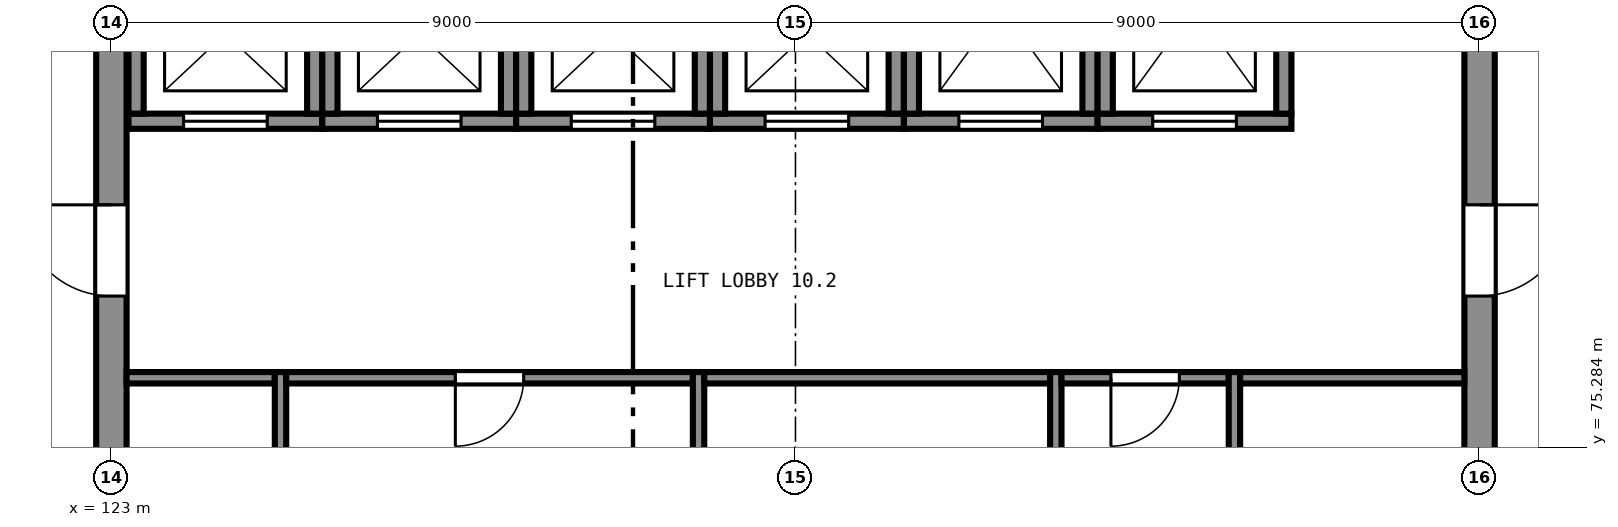
"""IFC4 building model, lengths in metres.
Left out: names, types, materials, properties, quantities, classifications, styles, units other than length and angle.
Written with IfcOpenShell. Run it as: python <this file> out.ifc"""

import sys

from ifc_helpers import new_model, si_unit, direction, frame, frame_2d, origin, place, context, subcontext, project, spatial, rectangle, extrude, element, fill, save


model = new_model("IFC4")
c1 = context("Model", 3, precision=1e-05, world=origin(), true_north=direction((0.0, 1.0)))
c2 = subcontext(c1, "Body", "Model", "MODEL_VIEW")
j1 = project(units=[si_unit("LENGTHUNIT", "METRE"), si_unit("PLANEANGLEUNIT", "RADIAN")], contexts=[c1])
p1 = place(None, origin())
s1 = spatial("IfcSite", under=j1, at=p1, CompositionType="ELEMENT")
p2 = place(p1, origin())
s2 = spatial("IfcBuilding", under=s1, at=p2, CompositionType="ELEMENT")
p3 = place(p2, frame((0.0, 0.0, 41.5)))
s3 = spatial("IfcBuildingStorey", under=s2, at=p3, CompositionType="ELEMENT", Elevation=41.5)
p4 = place(p3, frame((141.0, 65.2, 0.0), z_axis=(0.0, 0.0, 1.0), x_axis=(0.0, 1.0, 0.0)))
e1 = element("IfcWall", 1, at=p4, inside=s3, PredefinedType="SHEAR", context=c2, shape_type="SweptSolid", body=[
    extrude(rectangle(XDim=17.6, YDim=0.4, at=frame_2d((8.8, 0.0))), origin(), (0.0, 0.0, 1.0), 4.0),
])
p5 = place(p4, frame((4.325, 0.0, 0.0)))
e2 = element("IfcOpeningElement", 2, at=p5, cuts=e1, PredefinedType="OPENING", context=c2, shape_type="SweptSolid", body=[
    extrude(rectangle(XDim=1.2, YDim=2.1, at=frame_2d((0.6, 1.05))), frame((0.0, 0.21, 0.0), z_axis=(0.0, -1.0, 0.0), x_axis=(1.0, 0.0, 0.0)), (0.0, 0.0, 1.0), 0.42),
])
p6 = place(p4, frame((12.075, 0.0, 0.0)))
e3 = element("IfcOpeningElement", 3, at=p6, cuts=e1, PredefinedType="OPENING", context=c2, shape_type="SweptSolid", body=[
    extrude(rectangle(XDim=1.2, YDim=2.1, at=frame_2d((0.6, 1.05))), frame((0.0, 0.21, 0.0), z_axis=(0.0, -1.0, 0.0), x_axis=(1.0, 0.0, 0.0)), (0.0, 0.0, 1.0), 0.42),
])
p7 = place(p3, frame((123.0, 82.8, 0.0), z_axis=(0.0, 0.0, 1.0), x_axis=(0.0, -1.0, 0.0)))
e4 = element("IfcWall", 4, at=p7, inside=s3, PredefinedType="SHEAR", context=c2, shape_type="SweptSolid", body=[
    extrude(rectangle(XDim=17.6, YDim=0.4, at=frame_2d((8.8, 0.0))), origin(), (0.0, 0.0, 1.0), 4.0),
])
p8 = place(p7, frame((12.075, 0.0, 0.0)))
e5 = element("IfcOpeningElement", 5, at=p8, cuts=e4, PredefinedType="OPENING", context=c2, shape_type="SweptSolid", body=[
    extrude(rectangle(XDim=1.2, YDim=2.1, at=frame_2d((0.6, 1.05))), frame((0.0, 0.21, 0.0), z_axis=(0.0, -1.0, 0.0), x_axis=(1.0, 0.0, 0.0)), (0.0, 0.0, 1.0), 0.42),
])
p9 = place(p7, frame((4.325, 0.0, 0.0)))
e6 = element("IfcOpeningElement", 6, at=p9, cuts=e4, PredefinedType="OPENING", context=c2, shape_type="SweptSolid", body=[
    extrude(rectangle(XDim=1.2, YDim=2.1, at=frame_2d((0.6, 1.05))), frame((0.0, 0.21, 0.0), z_axis=(0.0, -1.0, 0.0), x_axis=(1.0, 0.0, 0.0)), (0.0, 0.0, 1.0), 0.42),
])
p10 = place(p3, frame((123.225, 79.575, 0.0), z_axis=(0.0, 0.0, 1.0), x_axis=(1.0, 0.0, 0.0)))
e7 = element("IfcWall", 7, at=p10, inside=s3, PredefinedType="SHEAR", context=c2, shape_type="SweptSolid", body=[
    extrude(rectangle(XDim=2.55, YDim=0.2, at=frame_2d((1.275, 0.0))), origin(), (0.0, 0.0, 1.0), 4.0),
])
p11 = place(p10, frame((0.725, 0.0, 0.0)))
e8 = element("IfcOpeningElement", 8, at=p11, cuts=e7, PredefinedType="OPENING", context=c2, shape_type="SweptSolid", body=[
    extrude(rectangle(XDim=1.1, YDim=2.1, at=frame_2d((0.55, 1.05))), frame((0.0, 0.11, 0.0), z_axis=(0.0, -1.0, 0.0), x_axis=(1.0, 0.0, 0.0)), (0.0, 0.0, 1.0), 0.22),
])
for number, where, z_axis, x_axis in (
    (9, (125.675, 79.675, 0.0), (0.0, 0.0, 1.0), (0.0, 1.0, 0.0)),
    (10, (123.325, 81.775, 0.0), (0.0, 0.0, 1.0), (0.0, -1.0, 0.0)),
):
    element("IfcWall", number, at=place(p3, frame(where, z_axis=z_axis, x_axis=x_axis)), inside=s3, PredefinedType="SHEAR", context=c2, shape_type="SweptSolid", body=[
        extrude(rectangle(XDim=2.1, YDim=0.2, at=frame_2d((1.05, 0.0))), origin(), (0.0, 0.0, 1.0), 4.0),
    ])
p12 = place(p3, frame((125.775, 79.575, 0.0), z_axis=(0.0, 0.0, 1.0), x_axis=(1.0, 0.0, 0.0)))
e11 = element("IfcWall", 11, at=p12, inside=s3, PredefinedType="SHEAR", context=c2, shape_type="SweptSolid", body=[
    extrude(rectangle(XDim=2.55, YDim=0.2, at=frame_2d((1.275, 0.0))), origin(), (0.0, 0.0, 1.0), 4.0),
])
p13 = place(p12, frame((0.725, 0.0, 0.0)))
e12 = element("IfcOpeningElement", 12, at=p13, cuts=e11, PredefinedType="OPENING", context=c2, shape_type="SweptSolid", body=[
    extrude(rectangle(XDim=1.1, YDim=2.1, at=frame_2d((0.55, 1.05))), frame((0.0, 0.11, 0.0), z_axis=(0.0, -1.0, 0.0), x_axis=(1.0, 0.0, 0.0)), (0.0, 0.0, 1.0), 0.22),
])
for number, where, z_axis, x_axis in (
    (13, (128.225, 79.675, 0.0), (0.0, 0.0, 1.0), (0.0, 1.0, 0.0)),
    (14, (125.875, 81.775, 0.0), (0.0, 0.0, 1.0), (0.0, -1.0, 0.0)),
):
    element("IfcWall", number, at=place(p3, frame(where, z_axis=z_axis, x_axis=x_axis)), inside=s3, PredefinedType="SHEAR", context=c2, shape_type="SweptSolid", body=[
        extrude(rectangle(XDim=2.1, YDim=0.2, at=frame_2d((1.05, 0.0))), origin(), (0.0, 0.0, 1.0), 4.0),
    ])
p14 = place(p3, frame((128.325, 79.575, 0.0), z_axis=(0.0, 0.0, 1.0), x_axis=(1.0, 0.0, 0.0)))
e15 = element("IfcWall", 15, at=p14, inside=s3, PredefinedType="SHEAR", context=c2, shape_type="SweptSolid", body=[
    extrude(rectangle(XDim=2.55, YDim=0.2, at=frame_2d((1.275, 0.0))), origin(), (0.0, 0.0, 1.0), 4.0),
])
p15 = place(p14, frame((0.725, 0.0, 0.0)))
e16 = element("IfcOpeningElement", 16, at=p15, cuts=e15, PredefinedType="OPENING", context=c2, shape_type="SweptSolid", body=[
    extrude(rectangle(XDim=1.1, YDim=2.1, at=frame_2d((0.55, 1.05))), frame((0.0, 0.11, 0.0), z_axis=(0.0, -1.0, 0.0), x_axis=(1.0, 0.0, 0.0)), (0.0, 0.0, 1.0), 0.22),
])
for number, where, z_axis, x_axis in (
    (17, (130.775, 79.675, 0.0), (0.0, 0.0, 1.0), (0.0, 1.0, 0.0)),
    (18, (128.425, 81.775, 0.0), (0.0, 0.0, 1.0), (0.0, -1.0, 0.0)),
):
    element("IfcWall", number, at=place(p3, frame(where, z_axis=z_axis, x_axis=x_axis)), inside=s3, PredefinedType="SHEAR", context=c2, shape_type="SweptSolid", body=[
        extrude(rectangle(XDim=2.1, YDim=0.2, at=frame_2d((1.05, 0.0))), origin(), (0.0, 0.0, 1.0), 4.0),
    ])
p16 = place(p3, frame((130.875, 79.575, 0.0), z_axis=(0.0, 0.0, 1.0), x_axis=(1.0, 0.0, 0.0)))
e19 = element("IfcWall", 19, at=p16, inside=s3, PredefinedType="SHEAR", context=c2, shape_type="SweptSolid", body=[
    extrude(rectangle(XDim=2.55, YDim=0.2, at=frame_2d((1.275, 0.0))), origin(), (0.0, 0.0, 1.0), 4.0),
])
p17 = place(p16, frame((0.725, 0.0, 0.0)))
e20 = element("IfcOpeningElement", 20, at=p17, cuts=e19, PredefinedType="OPENING", context=c2, shape_type="SweptSolid", body=[
    extrude(rectangle(XDim=1.1, YDim=2.1, at=frame_2d((0.55, 1.05))), frame((0.0, 0.11, 0.0), z_axis=(0.0, -1.0, 0.0), x_axis=(1.0, 0.0, 0.0)), (0.0, 0.0, 1.0), 0.22),
])
for number, where, z_axis, x_axis in (
    (21, (133.325, 79.675, 0.0), (0.0, 0.0, 1.0), (0.0, 1.0, 0.0)),
    (22, (130.975, 81.775, 0.0), (0.0, 0.0, 1.0), (0.0, -1.0, 0.0)),
):
    element("IfcWall", number, at=place(p3, frame(where, z_axis=z_axis, x_axis=x_axis)), inside=s3, PredefinedType="SHEAR", context=c2, shape_type="SweptSolid", body=[
        extrude(rectangle(XDim=2.1, YDim=0.2, at=frame_2d((1.05, 0.0))), origin(), (0.0, 0.0, 1.0), 4.0),
    ])
p18 = place(p3, frame((133.425, 79.575, 0.0), z_axis=(0.0, 0.0, 1.0), x_axis=(1.0, 0.0, 0.0)))
e23 = element("IfcWall", 23, at=p18, inside=s3, PredefinedType="SHEAR", context=c2, shape_type="SweptSolid", body=[
    extrude(rectangle(XDim=2.55, YDim=0.2, at=frame_2d((1.275, 0.0))), origin(), (0.0, 0.0, 1.0), 4.0),
])
p19 = place(p18, frame((0.725, 0.0, 0.0)))
e24 = element("IfcOpeningElement", 24, at=p19, cuts=e23, PredefinedType="OPENING", context=c2, shape_type="SweptSolid", body=[
    extrude(rectangle(XDim=1.1, YDim=2.1, at=frame_2d((0.55, 1.05))), frame((0.0, 0.11, 0.0), z_axis=(0.0, -1.0, 0.0), x_axis=(1.0, 0.0, 0.0)), (0.0, 0.0, 1.0), 0.22),
])
for number, where, z_axis, x_axis in (
    (25, (135.875, 79.675, 0.0), (0.0, 0.0, 1.0), (0.0, 1.0, 0.0)),
    (26, (133.525, 82.475, 0.0), (0.0, 0.0, 1.0), (0.0, -1.0, 0.0)),
):
    element("IfcWall", number, at=place(p3, frame(where, z_axis=z_axis, x_axis=x_axis)), inside=s3, PredefinedType="SHEAR", context=c2, shape_type="SweptSolid", body=[
        extrude(rectangle(XDim=2.8, YDim=0.2, at=frame_2d((1.4, 0.0))), origin(), (0.0, 0.0, 1.0), 4.0),
    ])
p20 = place(p3, frame((135.975, 79.575, 0.0), z_axis=(0.0, 0.0, 1.0), x_axis=(1.0, 0.0, 0.0)))
e27 = element("IfcWall", 27, at=p20, inside=s3, PredefinedType="SHEAR", context=c2, shape_type="SweptSolid", body=[
    extrude(rectangle(XDim=2.55, YDim=0.2, at=frame_2d((1.275, 0.0))), origin(), (0.0, 0.0, 1.0), 4.0),
])
p21 = place(p20, frame((0.725, 0.0, 0.0)))
e28 = element("IfcOpeningElement", 28, at=p21, cuts=e27, PredefinedType="OPENING", context=c2, shape_type="SweptSolid", body=[
    extrude(rectangle(XDim=1.1, YDim=2.1, at=frame_2d((0.55, 1.05))), frame((0.0, 0.11, 0.0), z_axis=(0.0, -1.0, 0.0), x_axis=(1.0, 0.0, 0.0)), (0.0, 0.0, 1.0), 0.22),
])
for number, where, z_axis, x_axis in (
    (29, (138.425, 79.675, 0.0), (0.0, 0.0, 1.0), (0.0, 1.0, 0.0)),
    (30, (136.075, 82.475, 0.0), (0.0, 0.0, 1.0), (0.0, -1.0, 0.0)),
):
    element("IfcWall", number, at=place(p3, frame(where, z_axis=z_axis, x_axis=x_axis)), inside=s3, PredefinedType="SHEAR", context=c2, shape_type="SweptSolid", body=[
        extrude(rectangle(XDim=2.8, YDim=0.2, at=frame_2d((1.4, 0.0))), origin(), (0.0, 0.0, 1.0), 4.0),
    ])
p22 = place(p3, frame((125.225, 71.725, 0.0), z_axis=(0.0, 0.0, 1.0), x_axis=(0.0, 1.0, 0.0)))
e31 = element("IfcWall", 31, at=p22, inside=s3, PredefinedType="PARTITIONING", context=c2, shape_type="SweptSolid", body=[
    extrude(rectangle(XDim=4.55, YDim=0.15, at=frame_2d((2.275, 0.0))), origin(), (0.0, 0.0, 1.0), 3.75),
])
p23 = place(p3, frame((123.2, 76.2, 0.0), z_axis=(0.0, 0.0, 1.0), x_axis=(1.0, 0.0, 0.0)))
e32 = element("IfcWall", 32, at=p23, inside=s3, PredefinedType="PARTITIONING", context=c2, shape_type="SweptSolid", body=[
    extrude(rectangle(XDim=1.95, YDim=0.15, at=frame_2d((0.975, 0.0))), origin(), (0.0, 0.0, 1.0), 3.75),
])
p24 = place(p3, frame((130.725, 71.725, 0.0), z_axis=(0.0, 0.0, 1.0), x_axis=(0.0, 1.0, 0.0)))
e33 = element("IfcWall", 33, at=p24, inside=s3, PredefinedType="PARTITIONING", context=c2, shape_type="SweptSolid", body=[
    extrude(rectangle(XDim=4.55, YDim=0.15, at=frame_2d((2.275, 0.0))), origin(), (0.0, 0.0, 1.0), 3.75),
])
p25 = place(p3, frame((125.3, 76.2, 0.0), z_axis=(0.0, 0.0, 1.0), x_axis=(1.0, 0.0, 0.0)))
e34 = element("IfcWall", 34, at=p25, inside=s3, PredefinedType="PARTITIONING", context=c2, shape_type="SweptSolid", body=[
    extrude(rectangle(XDim=5.35, YDim=0.15, at=frame_2d((2.675, 0.0))), origin(), (0.0, 0.0, 1.0), 3.75),
])
p26 = place(p25, frame((2.225, 0.0, 0.0)))
e35 = element("IfcOpeningElement", 35, at=p26, cuts=e34, PredefinedType="OPENING", context=c2, shape_type="SweptSolid", body=[
    extrude(rectangle(XDim=0.9, YDim=2.1, at=frame_2d((0.45, 1.05))), frame((0.0, 0.085, 0.0), z_axis=(0.0, -1.0, 0.0), x_axis=(1.0, 0.0, 0.0)), (0.0, 0.0, 1.0), 0.17),
])
p27 = place(p3, frame((135.425, 71.725, 0.0), z_axis=(0.0, 0.0, 1.0), x_axis=(0.0, 1.0, 0.0)))
e36 = element("IfcWall", 36, at=p27, inside=s3, PredefinedType="PARTITIONING", context=c2, shape_type="SweptSolid", body=[
    extrude(rectangle(XDim=4.55, YDim=0.15, at=frame_2d((2.275, 0.0))), origin(), (0.0, 0.0, 1.0), 3.75),
])
p28 = place(p3, frame((130.8, 76.2, 0.0), z_axis=(0.0, 0.0, 1.0), x_axis=(1.0, 0.0, 0.0)))
e37 = element("IfcWall", 37, at=p28, inside=s3, PredefinedType="PARTITIONING", context=c2, shape_type="SweptSolid", body=[
    extrude(rectangle(XDim=4.55, YDim=0.15, at=frame_2d((2.275, 0.0))), origin(), (0.0, 0.0, 1.0), 3.75),
])
p29 = place(p3, frame((137.775, 71.725, 0.0), z_axis=(0.0, 0.0, 1.0), x_axis=(0.0, 1.0, 0.0)))
e38 = element("IfcWall", 38, at=p29, inside=s3, PredefinedType="PARTITIONING", context=c2, shape_type="SweptSolid", body=[
    extrude(rectangle(XDim=4.55, YDim=0.15, at=frame_2d((2.275, 0.0))), origin(), (0.0, 0.0, 1.0), 3.75),
])
p30 = place(p3, frame((135.5, 76.2, 0.0), z_axis=(0.0, 0.0, 1.0), x_axis=(1.0, 0.0, 0.0)))
e39 = element("IfcWall", 39, at=p30, inside=s3, PredefinedType="PARTITIONING", context=c2, shape_type="SweptSolid", body=[
    extrude(rectangle(XDim=2.2, YDim=0.15, at=frame_2d((1.1, 0.0))), origin(), (0.0, 0.0, 1.0), 3.75),
])
p31 = place(p30, frame((0.65, 0.0, 0.0)))
e40 = element("IfcOpeningElement", 40, at=p31, cuts=e39, PredefinedType="OPENING", context=c2, shape_type="SweptSolid", body=[
    extrude(rectangle(XDim=0.9, YDim=2.1, at=frame_2d((0.45, 1.05))), frame((0.0, 0.085, 0.0), z_axis=(0.0, -1.0, 0.0), x_axis=(1.0, 0.0, 0.0)), (0.0, 0.0, 1.0), 0.17),
])
p32 = place(p3, frame((137.85, 76.2, 0.0), z_axis=(0.0, 0.0, 1.0), x_axis=(1.0, 0.0, 0.0)))
e41 = element("IfcWall", 41, at=p32, inside=s3, PredefinedType="PARTITIONING", context=c2, shape_type="SweptSolid", body=[
    extrude(rectangle(XDim=2.95, YDim=0.15, at=frame_2d((1.475, 0.0))), origin(), (0.0, 0.0, 1.0), 3.75),
])
p33 = place(p11, origin())
e42 = element("IfcDoor", 42, at=p33, inside=s3, OperationType="SLIDING_TO_LEFT", PredefinedType="DOOR", context=c2, shape_type="SweptSolid", body=[
    extrude(rectangle(XDim=1.1, YDim=2.1, at=frame_2d((0.55, 1.05))), frame((0.0, 0.025, 0.0), z_axis=(0.0, -1.0, 0.0), x_axis=(1.0, 0.0, 0.0)), (0.0, 0.0, 1.0), 0.05),
])
fill(e8, e42)
p34 = place(p13, origin())
e43 = element("IfcDoor", 43, at=p34, inside=s3, OperationType="SLIDING_TO_LEFT", PredefinedType="DOOR", context=c2, shape_type="SweptSolid", body=[
    extrude(rectangle(XDim=1.1, YDim=2.1, at=frame_2d((0.55, 1.05))), frame((0.0, 0.025, 0.0), z_axis=(0.0, -1.0, 0.0), x_axis=(1.0, 0.0, 0.0)), (0.0, 0.0, 1.0), 0.05),
])
fill(e12, e43)
p35 = place(p15, origin())
e44 = element("IfcDoor", 44, at=p35, inside=s3, OperationType="SLIDING_TO_LEFT", PredefinedType="DOOR", context=c2, shape_type="SweptSolid", body=[
    extrude(rectangle(XDim=1.1, YDim=2.1, at=frame_2d((0.55, 1.05))), frame((0.0, 0.025, 0.0), z_axis=(0.0, -1.0, 0.0), x_axis=(1.0, 0.0, 0.0)), (0.0, 0.0, 1.0), 0.05),
])
fill(e16, e44)
p36 = place(p17, origin())
e45 = element("IfcDoor", 45, at=p36, inside=s3, OperationType="SLIDING_TO_LEFT", PredefinedType="DOOR", context=c2, shape_type="SweptSolid", body=[
    extrude(rectangle(XDim=1.1, YDim=2.1, at=frame_2d((0.55, 1.05))), frame((0.0, 0.025, 0.0), z_axis=(0.0, -1.0, 0.0), x_axis=(1.0, 0.0, 0.0)), (0.0, 0.0, 1.0), 0.05),
])
fill(e20, e45)
p37 = place(p19, origin())
e46 = element("IfcDoor", 46, at=p37, inside=s3, OperationType="SLIDING_TO_LEFT", PredefinedType="DOOR", context=c2, shape_type="SweptSolid", body=[
    extrude(rectangle(XDim=1.1, YDim=2.1, at=frame_2d((0.55, 1.05))), frame((0.0, 0.025, 0.0), z_axis=(0.0, -1.0, 0.0), x_axis=(1.0, 0.0, 0.0)), (0.0, 0.0, 1.0), 0.05),
])
fill(e24, e46)
p38 = place(p21, origin())
e47 = element("IfcDoor", 47, at=p38, inside=s3, OperationType="SLIDING_TO_LEFT", PredefinedType="DOOR", context=c2, shape_type="SweptSolid", body=[
    extrude(rectangle(XDim=1.1, YDim=2.1, at=frame_2d((0.55, 1.05))), frame((0.0, 0.025, 0.0), z_axis=(0.0, -1.0, 0.0), x_axis=(1.0, 0.0, 0.0)), (0.0, 0.0, 1.0), 0.05),
])
fill(e28, e47)
p39 = place(p9, frame((1.2, 0.0, 0.0), z_axis=(0.0, 0.0, 1.0), x_axis=(-1.0, 0.0, 0.0)))
e48 = element("IfcDoor", 48, at=p39, inside=s3, OperationType="SINGLE_SWING_LEFT", PredefinedType="DOOR", context=c2, shape_type="SweptSolid", body=[
    extrude(rectangle(XDim=1.2, YDim=2.1, at=frame_2d((0.6, 1.05))), frame((0.0, 0.025, 0.0), z_axis=(0.0, -1.0, 0.0), x_axis=(1.0, 0.0, 0.0)), (0.0, 0.0, 1.0), 0.05),
])
fill(e6, e48)
p40 = place(p6, frame((1.2, 0.0, 0.0), z_axis=(0.0, 0.0, 1.0), x_axis=(-1.0, 0.0, 0.0)))
e49 = element("IfcDoor", 49, at=p40, inside=s3, OperationType="SINGLE_SWING_RIGHT", PredefinedType="DOOR", context=c2, shape_type="SweptSolid", body=[
    extrude(rectangle(XDim=1.2, YDim=2.1, at=frame_2d((0.6, 1.05))), frame((0.0, 0.025, 0.0), z_axis=(0.0, -1.0, 0.0), x_axis=(1.0, 0.0, 0.0)), (0.0, 0.0, 1.0), 0.05),
])
fill(e3, e49)
p41 = place(p26, frame((0.9, 0.0, 0.0), z_axis=(0.0, 0.0, 1.0), x_axis=(-1.0, 0.0, 0.0)))
e50 = element("IfcDoor", 50, at=p41, inside=s3, OperationType="SINGLE_SWING_LEFT", PredefinedType="DOOR", context=c2, shape_type="SweptSolid", body=[
    extrude(rectangle(XDim=0.9, YDim=2.1, at=frame_2d((0.45, 1.05))), frame((0.0, 0.025, 0.0), z_axis=(0.0, -1.0, 0.0), x_axis=(1.0, 0.0, 0.0)), (0.0, 0.0, 1.0), 0.05),
])
fill(e35, e50)
p42 = place(p31, frame((0.9, 0.0, 0.0), z_axis=(0.0, 0.0, 1.0), x_axis=(-1.0, 0.0, 0.0)))
e51 = element("IfcDoor", 51, at=p42, inside=s3, OperationType="SINGLE_SWING_LEFT", PredefinedType="DOOR", context=c2, shape_type="SweptSolid", body=[
    extrude(rectangle(XDim=0.9, YDim=2.1, at=frame_2d((0.45, 1.05))), frame((0.0, 0.025, 0.0), z_axis=(0.0, -1.0, 0.0), x_axis=(1.0, 0.0, 0.0)), (0.0, 0.0, 1.0), 0.05),
])
fill(e40, e51)
save(model, sys.argv[1])
